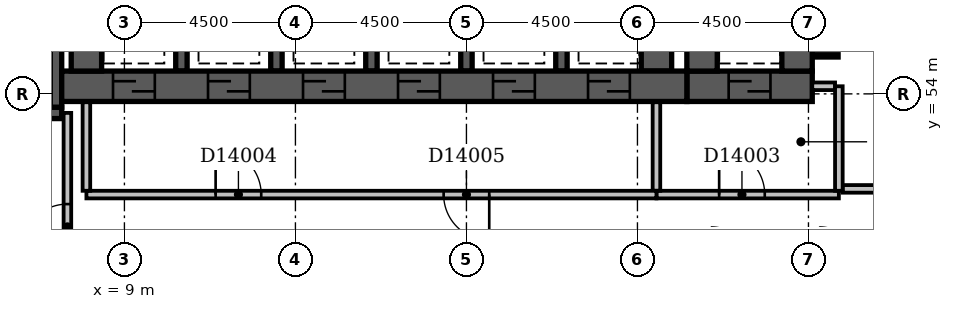
"""IFC4 building model, lengths in metres.
Left out: names, types, materials, properties, quantities, classifications, styles, units other than length and angle.
Written with IfcOpenShell. Run it as: python <this file> out.ifc"""

import sys

from ifc_helpers import new_model, si_unit, direction, frame, frame_2d, origin, place, context, subcontext, project, spatial, rectangle, extrude, element, fill, save


model = new_model("IFC4")
c1 = context("Model", 3, precision=1e-05, world=origin(), true_north=direction((0.0, 1.0)))
c2 = subcontext(c1, "Body", "Model", "MODEL_VIEW")
j1 = project(units=[si_unit("LENGTHUNIT", "METRE"), si_unit("PLANEANGLEUNIT", "RADIAN")], contexts=[c1])
p1 = place(None, origin())
s1 = spatial("IfcSite", under=j1, at=p1, CompositionType="ELEMENT")
p2 = place(p1, origin())
s2 = spatial("IfcBuilding", under=s1, at=p2, CompositionType="ELEMENT")
p3 = place(p2, frame((0.0, 0.0, 61.4)))
s3 = spatial("IfcBuildingStorey", under=s2, at=p3, CompositionType="ELEMENT", Elevation=61.4)
p4 = place(p3, frame((0.35, 53.5, -0.3), z_axis=(0.0, 0.0, 1.0), x_axis=(1.0, 0.0, 0.0)))
e1 = element("IfcWall", 1, at=p4, inside=s3, PredefinedType="SHEAR", context=c2, shape_type="SweptSolid", body=[
    extrude(rectangle(XDim=7.0, YDim=0.3, at=frame_2d((3.5, 0.0))), origin(), (0.0, 0.0, 1.0), 3.6),
])
p5 = place(p4, frame((5.58, 0.0, 0.3)))
e2 = element("IfcOpeningElement", 2, at=p5, cuts=e1, PredefinedType="OPENING", context=c2, shape_type="SweptSolid", body=[
    extrude(rectangle(XDim=1.1, YDim=2.1, at=frame_2d((0.55, 1.05))), frame((0.0, 0.162, 0.0), z_axis=(0.0, -1.0, 0.0), x_axis=(1.0, 0.0, 0.0)), (0.0, 0.0, 1.0), 0.324),
])
p6 = place(p3, frame((7.2, 53.65, -0.3), z_axis=(0.0, 0.0, 1.0), x_axis=(0.0, 1.0, 0.0)))
e3 = element("IfcWall", 3, at=p6, inside=s3, PredefinedType="SHEAR", context=c2, shape_type="SweptSolid", body=[
    extrude(rectangle(XDim=4.2, YDim=0.3, at=frame_2d((2.1, 0.0))), origin(), (0.0, 0.0, 1.0), 3.6),
])
p7 = place(p3, frame((7.35, 54.2, -0.3), z_axis=(0.0, 0.0, 1.0), x_axis=(1.0, 0.0, 0.0)))
e4 = element("IfcWall", 4, at=p7, inside=s3, PredefinedType="SHEAR", context=c2, shape_type="SweptSolid", body=[
    extrude(rectangle(XDim=16.45, YDim=0.8, at=frame_2d((8.225, 0.0))), origin(), (0.0, 0.0, 1.0), 3.6),
])
p8 = place(p7, frame((1.35, 0.0, 0.3)))
e5 = element("IfcOpeningElement", 5, at=p8, cuts=e4, PredefinedType="OPENING", context=c2, shape_type="SweptSolid", body=[
    extrude(rectangle(XDim=1.1, YDim=2.1, at=frame_2d((0.55, 1.05))), frame((0.0, 0.412, 0.0), z_axis=(0.0, -1.0, 0.0), x_axis=(1.0, 0.0, 0.0)), (0.0, 0.0, 1.0), 0.824),
])
p9 = place(p7, frame((3.85, 0.0, 0.3)))
e6 = element("IfcOpeningElement", 6, at=p9, cuts=e4, PredefinedType="OPENING", context=c2, shape_type="SweptSolid", body=[
    extrude(rectangle(XDim=1.1, YDim=2.1, at=frame_2d((0.55, 1.05))), frame((0.0, 0.412, 0.0), z_axis=(0.0, -1.0, 0.0), x_axis=(1.0, 0.0, 0.0)), (0.0, 0.0, 1.0), 0.824),
])
p10 = place(p7, frame((6.35, 0.0, 0.3)))
e7 = element("IfcOpeningElement", 7, at=p10, cuts=e4, PredefinedType="OPENING", context=c2, shape_type="SweptSolid", body=[
    extrude(rectangle(XDim=1.1, YDim=2.1, at=frame_2d((0.55, 1.05))), frame((0.0, 0.412, 0.0), z_axis=(0.0, -1.0, 0.0), x_axis=(1.0, 0.0, 0.0)), (0.0, 0.0, 1.0), 0.824),
])
p11 = place(p7, frame((8.85, 0.0, 0.3)))
e8 = element("IfcOpeningElement", 8, at=p11, cuts=e4, PredefinedType="OPENING", context=c2, shape_type="SweptSolid", body=[
    extrude(rectangle(XDim=1.1, YDim=2.1, at=frame_2d((0.55, 1.05))), frame((0.0, 0.412, 0.0), z_axis=(0.0, -1.0, 0.0), x_axis=(1.0, 0.0, 0.0)), (0.0, 0.0, 1.0), 0.824),
])
p12 = place(p7, frame((11.35, 0.0, 0.3)))
e9 = element("IfcOpeningElement", 9, at=p12, cuts=e4, PredefinedType="OPENING", context=c2, shape_type="SweptSolid", body=[
    extrude(rectangle(XDim=1.1, YDim=2.1, at=frame_2d((0.55, 1.05))), frame((0.0, 0.412, 0.0), z_axis=(0.0, -1.0, 0.0), x_axis=(1.0, 0.0, 0.0)), (0.0, 0.0, 1.0), 0.824),
])
p13 = place(p7, frame((13.85, 0.0, 0.3)))
e10 = element("IfcOpeningElement", 10, at=p13, cuts=e4, PredefinedType="OPENING", context=c2, shape_type="SweptSolid", body=[
    extrude(rectangle(XDim=1.1, YDim=2.1, at=frame_2d((0.55, 1.05))), frame((0.0, 0.412, 0.0), z_axis=(0.0, -1.0, 0.0), x_axis=(1.0, 0.0, 0.0)), (0.0, 0.0, 1.0), 0.824),
])
p14 = place(p3, frame((8.0, 54.6, -0.3), z_axis=(0.0, 0.0, 1.0), x_axis=(0.0, 1.0, 0.0)))
e11 = element("IfcWall", 11, at=p14, inside=s3, PredefinedType="SHEAR", context=c2, shape_type="SweptSolid", body=[
    extrude(rectangle(XDim=3.0, YDim=0.8, at=frame_2d((1.5, 0.0))), origin(), (0.0, 0.0, 1.0), 3.6),
])
for number, where, z_axis, x_axis in (
    (12, (10.5, 54.6, -0.3), (0.0, 0.0, 1.0), (0.0, 1.0, 0.0)),
    (13, (13.0, 54.6, -0.3), (0.0, 0.0, 1.0), (0.0, 1.0, 0.0)),
    (14, (15.5, 54.6, -0.3), (0.0, 0.0, 1.0), (0.0, 1.0, 0.0)),
    (15, (18.0, 54.6, -0.3), (0.0, 0.0, 1.0), (0.0, 1.0, 0.0)),
    (16, (20.5, 54.6, -0.3), (0.0, 0.0, 1.0), (0.0, 1.0, 0.0)),
):
    element("IfcWall", number, at=place(p3, frame(where, z_axis=z_axis, x_axis=x_axis)), inside=s3, PredefinedType="SHEAR", context=c2, shape_type="SweptSolid", body=[
        extrude(rectangle(XDim=3.0, YDim=0.3, at=frame_2d((1.5, 0.0))), origin(), (0.0, 0.0, 1.0), 3.6),
    ])
p15 = place(p3, frame((23.0, 54.6, -0.3), z_axis=(0.0, 0.0, 1.0), x_axis=(0.0, 1.0, 0.0)))
e17 = element("IfcWall", 17, at=p15, inside=s3, PredefinedType="SHEAR", context=c2, shape_type="SweptSolid", body=[
    extrude(rectangle(XDim=3.0, YDim=0.8, at=frame_2d((1.5, 0.0))), origin(), (0.0, 0.0, 1.0), 3.6),
])
p16 = place(p3, frame((23.8, 54.2, -0.3), z_axis=(0.0, 0.0, 1.0), x_axis=(1.0, 0.0, 0.0)))
e18 = element("IfcWall", 18, at=p16, inside=s3, PredefinedType="SHEAR", context=c2, shape_type="SweptSolid", body=[
    extrude(rectangle(XDim=3.3, YDim=0.8, at=frame_2d((1.65, 0.0))), origin(), (0.0, 0.0, 1.0), 3.6),
])
p17 = place(p16, frame((1.1, 0.0, 0.3)))
e19 = element("IfcOpeningElement", 19, at=p17, cuts=e18, PredefinedType="OPENING", context=c2, shape_type="SweptSolid", body=[
    extrude(rectangle(XDim=1.1, YDim=2.1, at=frame_2d((0.55, 1.05))), frame((0.0, 0.412, 0.0), z_axis=(0.0, -1.0, 0.0), x_axis=(1.0, 0.0, 0.0)), (0.0, 0.0, 1.0), 0.824),
])
for number, where, z_axis, x_axis in (
    (20, (24.2, 54.6, -0.3), (0.0, 0.0, 1.0), (0.0, 1.0, 0.0)),
    (21, (26.7, 54.6, -0.3), (0.0, 0.0, 1.0), (0.0, 1.0, 0.0)),
):
    element("IfcWall", number, at=place(p3, frame(where, z_axis=z_axis, x_axis=x_axis)), inside=s3, PredefinedType="SHEAR", context=c2, shape_type="SweptSolid", body=[
        extrude(rectangle(XDim=3.0, YDim=0.8, at=frame_2d((1.5, 0.0))), origin(), (0.0, 0.0, 1.0), 3.6),
    ])
p18 = place(p3, frame((8.0, 51.35, 0.0), z_axis=(0.0, 0.0, 1.0), x_axis=(1.0, 0.0, 0.0)))
e22 = element("IfcWall", 22, at=p18, inside=s3, PredefinedType="PARTITIONING", context=c2, shape_type="SweptSolid", body=[
    extrude(rectangle(XDim=15.0, YDim=0.2, at=frame_2d((7.5, 0.0))), origin(), (0.0, 0.0, 1.0), 3.3),
])
p19 = place(p18, frame((3.4, 0.0, 0.0)))
e23 = element("IfcOpeningElement", 23, at=p19, cuts=e22, PredefinedType="OPENING", context=c2, shape_type="SweptSolid", body=[
    extrude(rectangle(XDim=1.2, YDim=2.1, at=frame_2d((0.6, 1.05))), frame((0.0, 0.112, 0.0), z_axis=(0.0, -1.0, 0.0), x_axis=(1.0, 0.0, 0.0)), (0.0, 0.0, 1.0), 0.224),
])
p20 = place(p18, frame((9.4, 0.0, 0.0)))
e24 = element("IfcOpeningElement", 24, at=p20, cuts=e22, PredefinedType="OPENING", context=c2, shape_type="SweptSolid", body=[
    extrude(rectangle(XDim=1.2, YDim=2.1, at=frame_2d((0.6, 1.05))), frame((0.0, 0.112, 0.0), z_axis=(0.0, -1.0, 0.0), x_axis=(1.0, 0.0, 0.0)), (0.0, 0.0, 1.0), 0.224),
])
for number, where, z_axis, x_axis in (
    (25, (23.0, 51.45, 0.0), (0.0, 0.0, 1.0), (0.0, 1.0, 0.0)),
    (26, (8.0, 51.45, 0.0), (0.0, 0.0, 1.0), (0.0, 1.0, 0.0)),
):
    element("IfcWall", number, at=place(p3, frame(where, z_axis=z_axis, x_axis=x_axis)), inside=s3, PredefinedType="PARTITIONING", context=c2, shape_type="SweptSolid", body=[
        extrude(rectangle(XDim=2.33, YDim=0.2, at=frame_2d((1.165, 0.0))), origin(), (0.0, 0.0, 1.0), 3.3),
    ])
p21 = place(p3, frame((23.0, 51.35, 0.0), z_axis=(0.0, 0.0, 1.0), x_axis=(1.0, 0.0, 0.0)))
e27 = element("IfcWall", 27, at=p21, inside=s3, PredefinedType="PARTITIONING", context=c2, shape_type="SweptSolid", body=[
    extrude(rectangle(XDim=4.8, YDim=0.2, at=frame_2d((2.4, 0.0))), origin(), (0.0, 0.0, 1.0), 3.3),
])
p22 = place(p21, frame((1.65, 0.0, 0.0)))
e28 = element("IfcOpeningElement", 28, at=p22, cuts=e27, PredefinedType="OPENING", context=c2, shape_type="SweptSolid", body=[
    extrude(rectangle(XDim=1.2, YDim=2.1, at=frame_2d((0.6, 1.05))), frame((0.0, 0.112, 0.0), z_axis=(0.0, -1.0, 0.0), x_axis=(1.0, 0.0, 0.0)), (0.0, 0.0, 1.0), 0.224),
])
p23 = place(p3, frame((27.8, 51.45, 0.0), z_axis=(0.0, 0.0, 1.0), x_axis=(0.0, 1.0, 0.0)))
e29 = element("IfcWall", 29, at=p23, inside=s3, PredefinedType="PARTITIONING", context=c2, shape_type="SweptSolid", body=[
    extrude(rectangle(XDim=2.75, YDim=0.2, at=frame_2d((1.375, 0.0))), origin(), (0.0, 0.0, 1.0), 3.3),
])
p24 = place(p3, frame((27.1, 54.2, 0.0), z_axis=(0.0, 0.0, 1.0), x_axis=(1.0, 0.0, 0.0)))
e30 = element("IfcWall", 30, at=p24, inside=s3, PredefinedType="PARTITIONING", context=c2, shape_type="SweptSolid", body=[
    extrude(rectangle(XDim=0.6, YDim=0.2, at=frame_2d((0.3, 0.0))), origin(), (0.0, 0.0, 1.0), 3.3),
])
p25 = place(p3, frame((7.5, 49.6, 0.0), z_axis=(0.0, 0.0, 1.0), x_axis=(0.0, 1.0, 0.0)))
e31 = element("IfcWall", 31, at=p25, inside=s3, PredefinedType="PARTITIONING", context=c2, shape_type="SweptSolid", body=[
    extrude(rectangle(XDim=3.9, YDim=0.2, at=frame_2d((1.95, 0.0))), origin(), (0.0, 0.0, 1.0), 3.3),
])
p26 = place(p25, frame((0.3, 0.0, 0.0)))
e32 = element("IfcOpeningElement", 32, at=p26, cuts=e31, PredefinedType="OPENING", context=c2, shape_type="SweptSolid", body=[
    extrude(rectangle(XDim=1.2, YDim=2.1, at=frame_2d((0.6, 1.05))), frame((0.0, 0.112, 0.0), z_axis=(0.0, -1.0, 0.0), x_axis=(1.0, 0.0, 0.0)), (0.0, 0.0, 1.0), 0.224),
])
p27 = place(p3, frame((27.9, 51.5, 0.0), z_axis=(0.0, 0.0, 1.0), x_axis=(1.0, 0.0, 0.0)))
e33 = element("IfcWall", 33, at=p27, inside=s3, PredefinedType="PARTITIONING", context=c2, shape_type="SweptSolid", body=[
    extrude(rectangle(XDim=9.3, YDim=0.2, at=frame_2d((4.65, 0.0))), origin(), (0.0, 0.0, 1.0), 3.3),
])
p28 = place(p27, frame((4.2, 0.0, 0.0)))
e34 = element("IfcOpeningElement", 34, at=p28, cuts=e33, PredefinedType="OPENING", context=c2, shape_type="SweptSolid", body=[
    extrude(rectangle(XDim=0.9, YDim=2.1, at=frame_2d((0.45, 1.05))), frame((0.0, 0.112, 0.0), z_axis=(0.0, -1.0, 0.0), x_axis=(1.0, 0.0, 0.0)), (0.0, 0.0, 1.0), 0.224),
])
p29 = place(p3, frame((27.1, 55.0, 0.0), z_axis=(0.0, 0.0, 1.0), x_axis=(1.0, 0.0, 0.0)))
e35 = element("IfcWall", 35, at=p29, inside=s3, PredefinedType="PARTITIONING", context=c2, shape_type="SweptSolid", body=[
    extrude(rectangle(XDim=0.7, YDim=0.1, at=frame_2d((0.35, 0.0))), origin(), (0.0, 0.0, 1.0), 3.3),
])
p30 = place(p26, origin())
e36 = element("IfcDoor", 36, at=p30, inside=s3, OperationType="SINGLE_SWING_LEFT", PredefinedType="DOOR", context=c2, shape_type="SweptSolid", body=[
    extrude(rectangle(XDim=1.2, YDim=2.1, at=frame_2d((0.6, 1.05))), frame((0.0, 0.025, 0.0), z_axis=(0.0, -1.0, 0.0), x_axis=(1.0, 0.0, 0.0)), (0.0, 0.0, 1.0), 0.05),
])
fill(e32, e36)
p31 = place(p22, origin())
e37 = element("IfcDoor", 37, at=p31, inside=s3, OperationType="SINGLE_SWING_LEFT", PredefinedType="DOOR", context=c2, shape_type="SweptSolid", body=[
    extrude(rectangle(XDim=1.2, YDim=2.1, at=frame_2d((0.6, 1.05))), frame((0.0, 0.025, 0.0), z_axis=(0.0, -1.0, 0.0), x_axis=(1.0, 0.0, 0.0)), (0.0, 0.0, 1.0), 0.05),
])
fill(e28, e37)
p32 = place(p17, origin())
e38 = element("IfcDoor", 38, at=p32, inside=s3, OperationType="SLIDING_TO_LEFT", PredefinedType="DOOR", context=c2, shape_type="SweptSolid", body=[
    extrude(rectangle(XDim=1.1, YDim=2.1, at=frame_2d((0.55, 1.05))), frame((0.0, 0.025, 0.0), z_axis=(0.0, -1.0, 0.0), x_axis=(1.0, 0.0, 0.0)), (0.0, 0.0, 1.0), 0.05),
])
fill(e19, e38)
p33 = place(p8, origin())
e39 = element("IfcDoor", 39, at=p33, inside=s3, OperationType="SLIDING_TO_LEFT", PredefinedType="DOOR", context=c2, shape_type="SweptSolid", body=[
    extrude(rectangle(XDim=1.1, YDim=2.1, at=frame_2d((0.55, 1.05))), frame((0.0, 0.025, 0.0), z_axis=(0.0, -1.0, 0.0), x_axis=(1.0, 0.0, 0.0)), (0.0, 0.0, 1.0), 0.05),
])
fill(e5, e39)
p34 = place(p9, origin())
e40 = element("IfcDoor", 40, at=p34, inside=s3, OperationType="SLIDING_TO_LEFT", PredefinedType="DOOR", context=c2, shape_type="SweptSolid", body=[
    extrude(rectangle(XDim=1.1, YDim=2.1, at=frame_2d((0.55, 1.05))), frame((0.0, 0.025, 0.0), z_axis=(0.0, -1.0, 0.0), x_axis=(1.0, 0.0, 0.0)), (0.0, 0.0, 1.0), 0.05),
])
fill(e6, e40)
p35 = place(p10, origin())
e41 = element("IfcDoor", 41, at=p35, inside=s3, OperationType="SLIDING_TO_LEFT", PredefinedType="DOOR", context=c2, shape_type="SweptSolid", body=[
    extrude(rectangle(XDim=1.1, YDim=2.1, at=frame_2d((0.55, 1.05))), frame((0.0, 0.025, 0.0), z_axis=(0.0, -1.0, 0.0), x_axis=(1.0, 0.0, 0.0)), (0.0, 0.0, 1.0), 0.05),
])
fill(e7, e41)
p36 = place(p11, origin())
e42 = element("IfcDoor", 42, at=p36, inside=s3, OperationType="SLIDING_TO_LEFT", PredefinedType="DOOR", context=c2, shape_type="SweptSolid", body=[
    extrude(rectangle(XDim=1.1, YDim=2.1, at=frame_2d((0.55, 1.05))), frame((0.0, 0.025, 0.0), z_axis=(0.0, -1.0, 0.0), x_axis=(1.0, 0.0, 0.0)), (0.0, 0.0, 1.0), 0.05),
])
fill(e8, e42)
p37 = place(p12, origin())
e43 = element("IfcDoor", 43, at=p37, inside=s3, OperationType="SLIDING_TO_LEFT", PredefinedType="DOOR", context=c2, shape_type="SweptSolid", body=[
    extrude(rectangle(XDim=1.1, YDim=2.1, at=frame_2d((0.55, 1.05))), frame((0.0, 0.025, 0.0), z_axis=(0.0, -1.0, 0.0), x_axis=(1.0, 0.0, 0.0)), (0.0, 0.0, 1.0), 0.05),
])
fill(e9, e43)
p38 = place(p13, origin())
e44 = element("IfcDoor", 44, at=p38, inside=s3, OperationType="SLIDING_TO_LEFT", PredefinedType="DOOR", context=c2, shape_type="SweptSolid", body=[
    extrude(rectangle(XDim=1.1, YDim=2.1, at=frame_2d((0.55, 1.05))), frame((0.0, 0.025, 0.0), z_axis=(0.0, -1.0, 0.0), x_axis=(1.0, 0.0, 0.0)), (0.0, 0.0, 1.0), 0.05),
])
fill(e10, e44)
p39 = place(p19, origin())
e45 = element("IfcDoor", 45, at=p39, inside=s3, OperationType="SINGLE_SWING_LEFT", PredefinedType="DOOR", context=c2, shape_type="SweptSolid", body=[
    extrude(rectangle(XDim=1.2, YDim=2.1, at=frame_2d((0.6, 1.05))), frame((0.0, 0.025, 0.0), z_axis=(0.0, -1.0, 0.0), x_axis=(1.0, 0.0, 0.0)), (0.0, 0.0, 1.0), 0.05),
])
fill(e23, e45)
p40 = place(p20, origin())
e46 = element("IfcDoor", 46, at=p40, inside=s3, OperationType="SINGLE_SWING_RIGHT", PredefinedType="DOOR", context=c2, shape_type="SweptSolid", body=[
    extrude(rectangle(XDim=1.2, YDim=2.1, at=frame_2d((0.6, 1.05))), frame((0.0, 0.025, 0.0), z_axis=(0.0, -1.0, 0.0), x_axis=(1.0, 0.0, 0.0)), (0.0, 0.0, 1.0), 0.05),
])
fill(e24, e46)
save(model, sys.argv[1])
